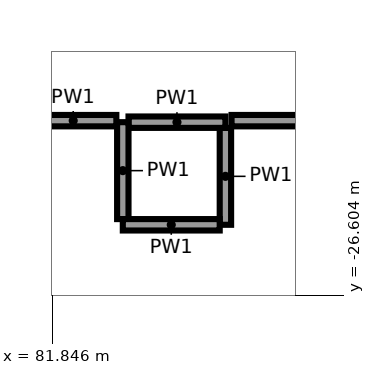
"""IFC4 building model, lengths in metres.
Left out: names, types, materials, properties, quantities, classifications, styles, units other than length and angle.
Written with IfcOpenShell. Run it as: python <this file> out.ifc"""

import sys

from ifc_helpers import new_model, si_unit, direction, frame, frame_2d, origin, place, context, subcontext, project, spatial, rectangle, extrude, element, save


model = new_model("IFC4")
c1 = context("Model", 3, precision=1e-05, world=origin(), true_north=direction((0.0, 1.0)))
c2 = subcontext(c1, "Body", "Model", "MODEL_VIEW")
j1 = project(units=[si_unit("LENGTHUNIT", "METRE"), si_unit("PLANEANGLEUNIT", "RADIAN")], contexts=[c1])
p1 = place(None, origin())
s1 = spatial("IfcSite", under=j1, at=p1, CompositionType="ELEMENT")
p2 = place(p1, origin())
s2 = spatial("IfcBuilding", under=s1, at=p2, CompositionType="ELEMENT")
p3 = place(p2, frame((0.0, 0.0, 12.0)))
s3 = spatial("IfcBuildingStorey", under=s2, at=p3, CompositionType="ELEMENT", Elevation=12.0)
p4 = place(p3, frame((84.125, -25.675, 0.0), z_axis=(0.0, 0.0, 1.0), x_axis=(0.0, 1.0, 0.0)))
e1 = element("IfcWall", 1, at=p4, inside=s3, PredefinedType="PARTITIONING", context=c2, shape_type="SweptSolid", body=[
    extrude(rectangle(XDim=1.275, YDim=0.15, at=frame_2d((0.638, 0.0))), origin(), (0.0, 0.0, 1.0), 5.65),
])
p5 = place(p3, frame((84.125, -24.325, 0.0), z_axis=(0.0, 0.0, 1.0), x_axis=(-1.0, 0.0, 0.0)))
e2 = element("IfcWall", 2, at=p5, inside=s3, PredefinedType="PARTITIONING", context=c2, shape_type="SweptSolid", body=[
    extrude(rectangle(XDim=1.275, YDim=0.15, at=frame_2d((0.637, 0.0))), origin(), (0.0, 0.0, 1.0), 5.65),
])
for number, where, z_axis, x_axis in (
    (3, (82.775, -24.325, 0.0), (0.0, 0.0, 1.0), (0.0, -1.0, 0.0)),
    (4, (82.775, -25.675, 0.0), (0.0, 0.0, 1.0), (1.0, 0.0, 0.0)),
):
    element("IfcWall", number, at=place(p3, frame(where, z_axis=z_axis, x_axis=x_axis)), inside=s3, PredefinedType="PARTITIONING", context=c2, shape_type="SweptSolid", body=[
        extrude(rectangle(XDim=1.275, YDim=0.15, at=frame_2d((0.638, 0.0))), origin(), (0.0, 0.0, 1.0), 5.65),
    ])
p6 = place(p3, frame((82.69, -24.305, 0.0), z_axis=(0.0, 0.0, 1.0), x_axis=(-1.0, 0.0, 0.0)))
e5 = element("IfcWall", 5, at=p6, inside=s3, PredefinedType="PARTITIONING", context=c2, shape_type="SweptSolid", body=[
    extrude(rectangle(XDim=1.135, YDim=0.15, at=frame_2d((0.567, 0.0))), origin(), (0.0, 0.0, 1.0), 5.65),
])
p7 = place(p3, frame((87.909, -24.305, 0.0), z_axis=(0.0, 0.0, 1.0), x_axis=(-1.0, 0.0, 0.0)))
e6 = element("IfcWall", 6, at=p7, inside=s3, PredefinedType="PARTITIONING", context=c2, shape_type="SweptSolid", body=[
    extrude(rectangle(XDim=3.704, YDim=0.15, at=frame_2d((1.852, 0.0))), origin(), (0.0, 0.0, 1.0), 4.55),
])
p8 = place(p7, frame((0.65, 0.0, 0.0)))
e7 = element("IfcOpeningElement", 7, at=p8, cuts=e6, PredefinedType="OPENING", context=c2, shape_type="SweptSolid", body=[
    extrude(rectangle(XDim=1.8, YDim=2.1, at=frame_2d((0.9, 1.05))), frame((0.0, 0.085, 0.0), z_axis=(0.0, -1.0, 0.0), x_axis=(1.0, 0.0, 0.0)), (0.0, 0.0, 1.0), 0.17),
])
save(model, sys.argv[1])
